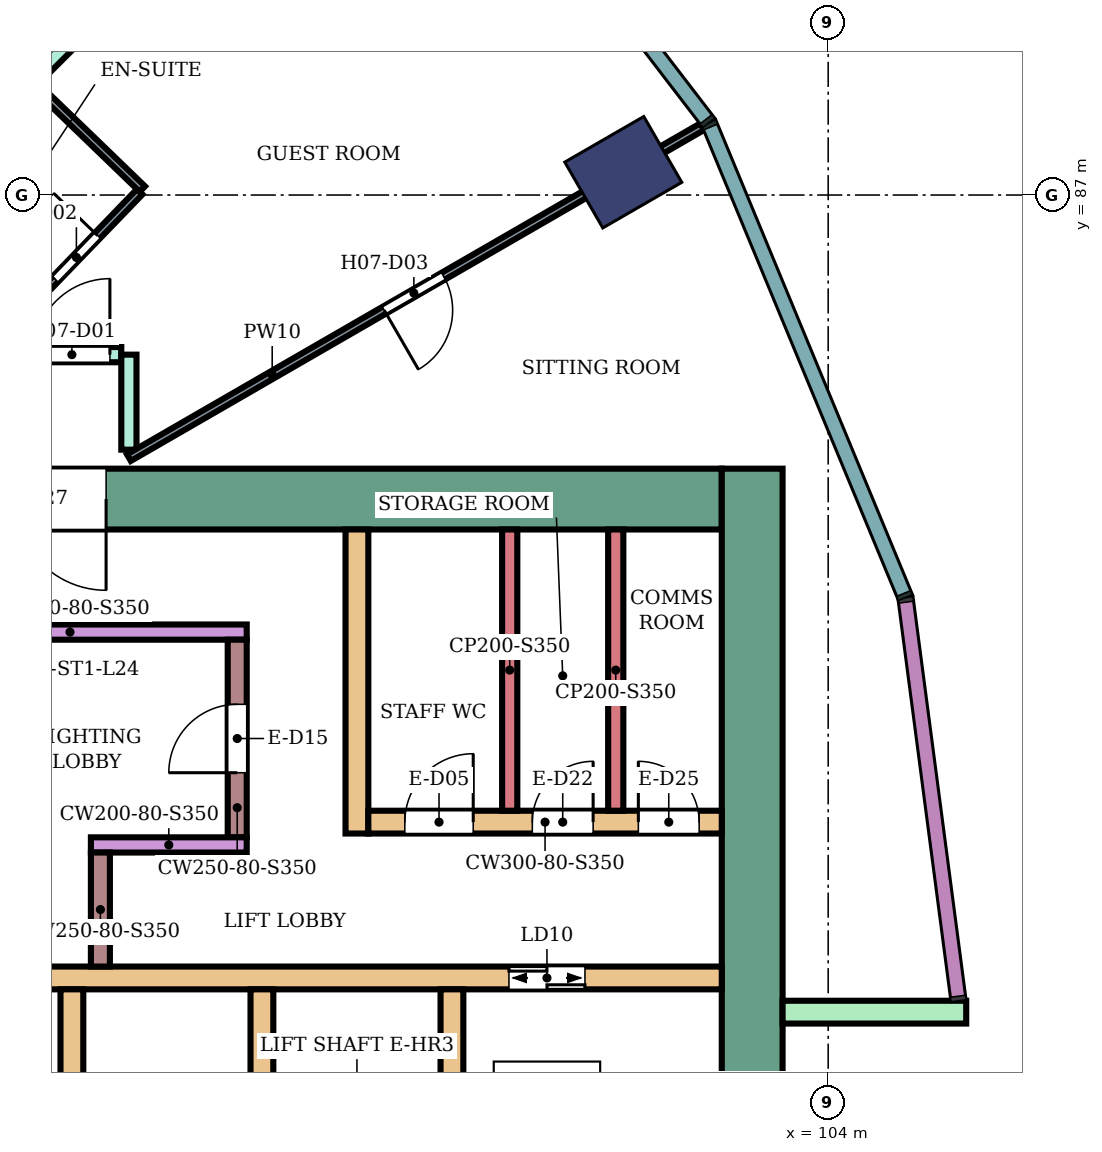
"""IFC4 building model, lengths in metres.
Left out: names, types, materials, properties, quantities, classifications, styles, units other than length and angle.
Written with IfcOpenShell. Run it as: python <this file> out.ifc"""

import sys

from ifc_helpers import new_model, si_unit, direction, frame, frame_2d, origin, origin_2d, place, context, subcontext, project, spatial, rectangle, extrude, element, fill, save


model = new_model("IFC4")
c1 = context("Model", 3, precision=1e-05, world=origin(), true_north=direction((0.0, 1.0)))
c2 = subcontext(c1, "Body", "Model", "MODEL_VIEW")
j1 = project(units=[si_unit("LENGTHUNIT", "METRE"), si_unit("PLANEANGLEUNIT", "RADIAN")], contexts=[c1])
p1 = place(None, origin())
s1 = spatial("IfcSite", under=j1, at=p1, CompositionType="ELEMENT")
p2 = place(p1, origin())
s2 = spatial("IfcBuilding", under=s1, at=p2, CompositionType="ELEMENT")
p3 = place(p2, frame((0.0, 0.0, 105.2)))
s3 = spatial("IfcBuildingStorey", under=s2, at=p3, CompositionType="ELEMENT", Elevation=105.2)
p4 = place(p3, frame((101.304, 87.3, 0.0), z_axis=(0.0, 0.0, 1.0), x_axis=(0.866025403784, 0.5, 0.0)))
e1 = element("IfcColumn", 1, at=p4, inside=s3, PredefinedType="COLUMN", context=c2, shape_type="SweptSolid", body=[
    extrude(rectangle(XDim=1.2, YDim=1.0, at=origin_2d()), origin(), (0.0, 0.0, 1.0), 3.8),
])
p5 = place(p3, frame((87.9, 83.0, 0.0), z_axis=(0.0, 0.0, 1.0), x_axis=(1.0, 0.0, 0.0)))
e2 = element("IfcWall", 2, at=p5, inside=s3, PredefinedType="SHEAR", context=c2, shape_type="SweptSolid", body=[
    extrude(rectangle(XDim=14.7, YDim=0.8, at=frame_2d((7.35, 0.0))), origin(), (0.0, 0.0, 1.0), 3.45),
])
p6 = place(p5, frame((4.2, 0.0, 0.0)))
e3 = element("IfcOpeningElement", 3, at=p6, cuts=e2, PredefinedType="OPENING", context=c2, shape_type="SweptSolid", body=[
    extrude(rectangle(XDim=2.4, YDim=2.4, at=frame_2d((1.2, 1.2))), frame((0.0, 0.41, 0.0), z_axis=(0.0, -1.0, 0.0), x_axis=(1.0, 0.0, 0.0)), (0.0, 0.0, 1.0), 0.82),
])
p7 = place(p3, frame((103.0, 66.6, 0.0), z_axis=(0.0, 0.0, 1.0), x_axis=(0.0, 1.0, 0.0)))
e4 = element("IfcWall", 4, at=p7, inside=s3, PredefinedType="SHEAR", context=c2, shape_type="SweptSolid", body=[
    extrude(rectangle(XDim=16.8, YDim=0.8, at=frame_2d((8.4, 0.0))), origin(), (0.0, 0.0, 1.0), 3.45),
])
p8 = place(p3, frame((91.7, 76.7, 0.0), z_axis=(0.0, 0.0, 1.0), x_axis=(1.0, 0.0, 0.0)))
e5 = element("IfcWall", 5, at=p8, inside=s3, PredefinedType="SHEAR", context=c2, shape_type="SweptSolid", body=[
    extrude(rectangle(XDim=10.9, YDim=0.3, at=frame_2d((5.45, 0.0))), origin(), (0.0, 0.0, 1.0), 3.45),
])
p9 = place(p8, frame((0.55, 0.0, 0.0)))
e6 = element("IfcOpeningElement", 6, at=p9, cuts=e5, PredefinedType="OPENING", context=c2, shape_type="SweptSolid", body=[
    extrude(rectangle(XDim=1.1, YDim=2.1, at=frame_2d((0.55, 1.05))), frame((0.0, 0.16, 0.0), z_axis=(0.0, -1.0, 0.0), x_axis=(1.0, 0.0, 0.0)), (0.0, 0.0, 1.0), 0.32),
])
p10 = place(p8, frame((8.1, 0.0, 0.0)))
e7 = element("IfcOpeningElement", 7, at=p10, cuts=e5, PredefinedType="OPENING", context=c2, shape_type="SweptSolid", body=[
    extrude(rectangle(XDim=1.0, YDim=2.1, at=frame_2d((0.5, 1.05))), frame((0.0, 0.16, 0.0), z_axis=(0.0, -1.0, 0.0), x_axis=(1.0, 0.0, 0.0)), (0.0, 0.0, 1.0), 0.32),
])
for number, where, z_axis, x_axis in (
    (8, (94.05, 74.0, 0.0), (0.0, 0.0, 1.0), (0.0, 1.0, 0.0)),
    (9, (96.55, 74.0, 0.0), (0.0, 0.0, 1.0), (0.0, 1.0, 0.0)),
    (10, (99.05, 74.0, 0.0), (0.0, 0.0, 1.0), (0.0, 1.0, 0.0)),
):
    element("IfcWall", number, at=place(p3, frame(where, z_axis=z_axis, x_axis=x_axis)), inside=s3, PredefinedType="SHEAR", context=c2, shape_type="SweptSolid", body=[
        extrude(rectangle(XDim=2.55, YDim=0.3, at=frame_2d((1.275, 0.0))), origin(), (0.0, 0.0, 1.0), 3.45),
    ])
p11 = place(p3, frame((91.7, 81.25, 0.0), z_axis=(0.0, 0.0, 1.0), x_axis=(1.0, 0.0, 0.0)))
e11 = element("IfcWall", 11, at=p11, inside=s3, PredefinedType="SHEAR", context=c2, shape_type="SweptSolid", body=[
    extrude(rectangle(XDim=4.65, YDim=0.2, at=frame_2d((2.325, 0.0))), origin(), (0.0, 0.0, 1.0), 3.45),
])
p12 = place(p3, frame((96.225, 78.55, 0.0), z_axis=(0.0, 0.0, 1.0), x_axis=(0.0, 1.0, 0.0)))
e12 = element("IfcWall", 12, at=p12, inside=s3, PredefinedType="SHEAR", context=c2, shape_type="SweptSolid", body=[
    extrude(rectangle(XDim=2.6, YDim=0.25, at=frame_2d((1.3, 0.0))), origin(), (0.0, 0.0, 1.0), 3.45),
])
p13 = place(p12, frame((0.85, 0.0, 0.0)))
e13 = element("IfcOpeningElement", 13, at=p13, cuts=e12, PredefinedType="OPENING", context=c2, shape_type="SweptSolid", body=[
    extrude(rectangle(XDim=0.9, YDim=2.1, at=frame_2d((0.45, 1.05))), frame((0.0, 0.135, 0.0), z_axis=(0.0, -1.0, 0.0), x_axis=(1.0, 0.0, 0.0)), (0.0, 0.0, 1.0), 0.27),
])
p14 = place(p3, frame((94.3, 78.45, 0.0), z_axis=(0.0, 0.0, 1.0), x_axis=(1.0, 0.0, 0.0)))
e14 = element("IfcWall", 14, at=p14, inside=s3, PredefinedType="SHEAR", context=c2, shape_type="SweptSolid", body=[
    extrude(rectangle(XDim=2.05, YDim=0.2, at=frame_2d((1.025, 0.0))), origin(), (0.0, 0.0, 1.0), 3.45),
])
p15 = place(p3, frame((94.425, 76.85, 0.0), z_axis=(0.0, 0.0, 1.0), x_axis=(0.0, 1.0, 0.0)))
e15 = element("IfcWall", 15, at=p15, inside=s3, PredefinedType="SHEAR", context=c2, shape_type="SweptSolid", body=[
    extrude(rectangle(XDim=1.5, YDim=0.25, at=frame_2d((0.75, 0.0))), origin(), (0.0, 0.0, 1.0), 3.45),
])
p16 = place(p3, frame((97.8, 78.6, 0.0), z_axis=(0.0, 0.0, 1.0), x_axis=(0.0, 1.0, 0.0)))
e16 = element("IfcWall", 16, at=p16, inside=s3, PredefinedType="SHEAR", context=c2, shape_type="SweptSolid", body=[
    extrude(rectangle(XDim=4.0, YDim=0.3, at=frame_2d((2.0, 0.0))), origin(), (0.0, 0.0, 1.0), 3.45),
])
p17 = place(p3, frame((97.95, 78.75, 0.0), z_axis=(0.0, 0.0, 1.0), x_axis=(1.0, 0.0, 0.0)))
e17 = element("IfcWall", 17, at=p17, inside=s3, PredefinedType="SHEAR", context=c2, shape_type="SweptSolid", body=[
    extrude(rectangle(XDim=4.65, YDim=0.3, at=frame_2d((2.325, 0.0))), origin(), (0.0, 0.0, 1.0), 3.45),
])
p18 = place(p17, frame((0.48, 0.0, 0.0)))
e18 = element("IfcOpeningElement", 18, at=p18, cuts=e17, PredefinedType="OPENING", context=c2, shape_type="SweptSolid", body=[
    extrude(rectangle(XDim=0.9, YDim=2.1, at=frame_2d((0.45, 1.05))), frame((0.0, 0.16, 0.0), z_axis=(0.0, -1.0, 0.0), x_axis=(1.0, 0.0, 0.0)), (0.0, 0.0, 1.0), 0.32),
])
p19 = place(p17, frame((2.157, 0.0, 0.0)))
e19 = element("IfcOpeningElement", 19, at=p19, cuts=e17, PredefinedType="OPENING", context=c2, shape_type="SweptSolid", body=[
    extrude(rectangle(XDim=0.8, YDim=2.1, at=frame_2d((0.4, 1.05))), frame((0.0, 0.16, 0.0), z_axis=(0.0, -1.0, 0.0), x_axis=(1.0, 0.0, 0.0)), (0.0, 0.0, 1.0), 0.32),
])
p20 = place(p17, frame((3.552, 0.0, 0.0)))
e20 = element("IfcOpeningElement", 20, at=p20, cuts=e17, PredefinedType="OPENING", context=c2, shape_type="SweptSolid", body=[
    extrude(rectangle(XDim=0.8, YDim=2.1, at=frame_2d((0.4, 1.05))), frame((0.0, 0.16, 0.0), z_axis=(0.0, -1.0, 0.0), x_axis=(1.0, 0.0, 0.0)), (0.0, 0.0, 1.0), 0.32),
])
p21 = place(p3, frame((103.4, 76.25, 0.0), z_axis=(0.0, 0.0, 1.0), x_axis=(1.0, 0.0, 0.0)))
e21 = element("IfcWall", 21, at=p21, inside=s3, PredefinedType="NOTDEFINED", context=c2, shape_type="SweptSolid", body=[
    extrude(rectangle(XDim=2.416, YDim=0.3, at=frame_2d((1.208, 0.0))), origin(), (0.0, 0.0, 1.0), 3.8),
])
p22 = place(p3, frame((91.595, 86.59, 0.0), z_axis=(0.0, 0.0, 1.0), x_axis=(0.707268206752, 0.706945318761, 0.0)))
e22 = element("IfcWall", 22, at=p22, inside=s3, PredefinedType="PARTITIONING", context=c2, shape_type="SweptSolid", body=[
    extrude(rectangle(XDim=6.805, YDim=0.2, at=frame_2d((3.402, 0.0))), origin(), (0.0, 0.0, 1.0), 3.35),
])
p23 = place(p3, frame((93.203, 84.9, 0.0), z_axis=(0.0, 0.0, 1.0), x_axis=(1.0, 0.0, 0.0)))
e23 = element("IfcWall", 23, at=p23, inside=s3, PredefinedType="PARTITIONING", context=c2, shape_type="SweptSolid", body=[
    extrude(rectangle(XDim=1.497, YDim=0.2, at=frame_2d((0.749, 0.0))), origin(), (0.0, 0.0, 1.0), 3.35),
])
p24 = place(p23, frame((0.347, 0.0, 0.0)))
e24 = element("IfcOpeningElement", 24, at=p24, cuts=e23, PredefinedType="OPENING", context=c2, shape_type="SweptSolid", body=[
    extrude(rectangle(XDim=1.0, YDim=2.1, at=frame_2d((0.5, 1.05))), frame((0.0, 0.11, 0.0), z_axis=(0.0, -1.0, 0.0), x_axis=(1.0, 0.0, 0.0)), (0.0, 0.0, 1.0), 0.22),
])
p25 = place(p3, frame((94.8, 83.65, 0.0), z_axis=(0.0, 0.0, 1.0), x_axis=(0.0, 1.0, 0.0)))
e25 = element("IfcWall", 25, at=p25, inside=s3, PredefinedType="PARTITIONING", context=c2, shape_type="SweptSolid", body=[
    extrude(rectangle(XDim=1.25, YDim=0.2, at=frame_2d((0.625, 0.0))), origin(), (0.0, 0.0, 1.0), 3.35),
])
p26 = place(p3, frame((93.103, 85.136, 0.0), z_axis=(0.0, 0.0, 1.0), x_axis=(0.694324808789, 0.719661767708, 0.0)))
e26 = element("IfcWall", 26, at=p26, inside=s3, PredefinedType="PARTITIONING", context=c2, shape_type="SweptSolid", body=[
    extrude(rectangle(XDim=2.65, YDim=0.1, at=frame_2d((1.325, 0.0))), origin(), (0.0, 0.0, 1.0), 3.35),
])
p27 = place(p26, frame((1.05, 0.0, 0.0)))
e27 = element("IfcOpeningElement", 27, at=p27, cuts=e26, PredefinedType="OPENING", context=c2, shape_type="SweptSolid", body=[
    extrude(rectangle(XDim=0.8, YDim=2.1, at=frame_2d((0.4, 1.05))), frame((0.0, 0.06, 0.0), z_axis=(0.0, -1.0, 0.0), x_axis=(1.0, 0.0, 0.0)), (0.0, 0.0, 1.0), 0.12),
])
p28 = place(p3, frame((93.581, 88.426, 0.0), z_axis=(0.0, 0.0, 1.0), x_axis=(0.719707242969, -0.694277670977, 0.0)))
e28 = element("IfcWall", 28, at=p28, inside=s3, PredefinedType="PARTITIONING", context=c2, shape_type="SweptSolid", body=[
    extrude(rectangle(XDim=1.939, YDim=0.1, at=frame_2d((0.97, 0.0))), origin(), (0.0, 0.0, 1.0), 3.35),
])
p29 = place(p3, frame((94.8, 83.545, 0.0), z_axis=(0.0, 0.0, 1.0), x_axis=(0.86602264145, 0.500004784474, 0.0)))
e29 = element("IfcWall", 29, at=p29, inside=s3, PredefinedType="PARTITIONING", context=c2, shape_type="SweptSolid", body=[
    extrude(rectangle(XDim=8.708, YDim=0.1, at=frame_2d((4.354, 0.0))), origin(), (0.0, 0.0, 1.0), 3.35),
])
p30 = place(p29, frame((3.879, 0.0, 0.0)))
e30 = element("IfcOpeningElement", 30, at=p30, cuts=e29, PredefinedType="OPENING", context=c2, shape_type="SweptSolid", body=[
    extrude(rectangle(XDim=0.9, YDim=2.1, at=frame_2d((0.45, 1.05))), frame((0.0, 0.06, 0.0), z_axis=(0.0, -1.0, 0.0), x_axis=(1.0, 0.0, 0.0)), (0.0, 0.0, 1.0), 0.12),
])
for number, where, z_axis, x_axis in (
    (31, (99.81, 78.9, 0.0), (0.0, 0.0, 1.0), (0.0, 1.0, 0.0)),
    (32, (101.205, 78.9, 0.0), (0.0, 0.0, 1.0), (0.0, 1.0, 0.0)),
):
    element("IfcWall", number, at=place(p3, frame(where, z_axis=z_axis, x_axis=x_axis)), inside=s3, PredefinedType="PARTITIONING", context=c2, shape_type="SweptSolid", body=[
        extrude(rectangle(XDim=3.7, YDim=0.2, at=frame_2d((1.85, 0.0))), origin(), (0.0, 0.0, 1.0), 3.45),
    ])
p31 = place(p24, origin())
e33 = element("IfcDoor", 33, at=p31, inside=s3, OperationType="SINGLE_SWING_RIGHT", PredefinedType="DOOR", context=c2, shape_type="SweptSolid", body=[
    extrude(rectangle(XDim=1.0, YDim=2.1, at=frame_2d((0.5, 1.05))), frame((0.0, 0.025, 0.0), z_axis=(0.0, -1.0, 0.0), x_axis=(1.0, 0.0, 0.0)), (0.0, 0.0, 1.0), 0.05),
])
fill(e24, e33)
p32 = place(p27, origin())
e34 = element("IfcDoor", 34, at=p32, inside=s3, OperationType="SINGLE_SWING_RIGHT", PredefinedType="DOOR", context=c2, shape_type="SweptSolid", body=[
    extrude(rectangle(XDim=0.8, YDim=2.1, at=frame_2d((0.4, 1.05))), frame((0.0, 0.025, 0.0), z_axis=(0.0, -1.0, 0.0), x_axis=(1.0, 0.0, 0.0)), (0.0, 0.0, 1.0), 0.05),
])
fill(e27, e34)
p33 = place(p30, frame((0.9, 0.0, 0.0), z_axis=(0.0, 0.0, 1.0), x_axis=(-1.0, 0.0, 0.0)))
e35 = element("IfcDoor", 35, at=p33, inside=s3, OperationType="SINGLE_SWING_RIGHT", PredefinedType="DOOR", context=c2, shape_type="SweptSolid", body=[
    extrude(rectangle(XDim=0.9, YDim=2.1, at=frame_2d((0.45, 1.05))), frame((0.0, 0.025, 0.0), z_axis=(0.0, -1.0, 0.0), x_axis=(1.0, 0.0, 0.0)), (0.0, 0.0, 1.0), 0.05),
])
fill(e30, e35)
p34 = place(p10, origin())
e36 = element("IfcDoor", 36, at=p34, inside=s3, OperationType="DOUBLE_DOOR_SLIDING", PredefinedType="DOOR", context=c2, shape_type="SweptSolid", body=[
    extrude(rectangle(XDim=1.0, YDim=2.1, at=frame_2d((0.5, 1.05))), frame((0.0, 0.025, 0.0), z_axis=(0.0, -1.0, 0.0), x_axis=(1.0, 0.0, 0.0)), (0.0, 0.0, 1.0), 0.05),
])
fill(e7, e36)
p35 = place(p13, origin())
e37 = element("IfcDoor", 37, at=p35, inside=s3, OperationType="SINGLE_SWING_LEFT", PredefinedType="DOOR", context=c2, shape_type="SweptSolid", body=[
    extrude(rectangle(XDim=0.9, YDim=2.1, at=frame_2d((0.45, 1.05))), frame((0.0, 0.025, 0.0), z_axis=(0.0, -1.0, 0.0), x_axis=(1.0, 0.0, 0.0)), (0.0, 0.0, 1.0), 0.05),
])
fill(e13, e37)
p36 = place(p18, origin())
e38 = element("IfcDoor", 38, at=p36, inside=s3, OperationType="SINGLE_SWING_RIGHT", PredefinedType="DOOR", context=c2, shape_type="SweptSolid", body=[
    extrude(rectangle(XDim=0.9, YDim=2.1, at=frame_2d((0.45, 1.05))), frame((0.0, 0.025, 0.0), z_axis=(0.0, -1.0, 0.0), x_axis=(1.0, 0.0, 0.0)), (0.0, 0.0, 1.0), 0.05),
])
fill(e18, e38)
p37 = place(p19, origin())
e39 = element("IfcDoor", 39, at=p37, inside=s3, OperationType="SINGLE_SWING_RIGHT", PredefinedType="DOOR", context=c2, shape_type="SweptSolid", body=[
    extrude(rectangle(XDim=0.8, YDim=2.1, at=frame_2d((0.4, 1.05))), frame((0.0, 0.025, 0.0), z_axis=(0.0, -1.0, 0.0), x_axis=(1.0, 0.0, 0.0)), (0.0, 0.0, 1.0), 0.05),
])
fill(e19, e39)
p38 = place(p20, origin())
e40 = element("IfcDoor", 40, at=p38, inside=s3, OperationType="SINGLE_SWING_LEFT", PredefinedType="DOOR", context=c2, shape_type="SweptSolid", body=[
    extrude(rectangle(XDim=0.8, YDim=2.1, at=frame_2d((0.4, 1.05))), frame((0.0, 0.025, 0.0), z_axis=(0.0, -1.0, 0.0), x_axis=(1.0, 0.0, 0.0)), (0.0, 0.0, 1.0), 0.05),
])
fill(e20, e40)
p39 = place(p6, frame((2.4, 0.0, 0.0), z_axis=(0.0, 0.0, 1.0), x_axis=(-1.0, 0.0, 0.0)))
e41 = element("IfcDoor", 41, at=p39, inside=s3, OperationType="DOUBLE_DOOR_SINGLE_SWING", PredefinedType="DOOR", context=c2, shape_type="SweptSolid", body=[
    extrude(rectangle(XDim=2.4, YDim=2.4, at=frame_2d((1.2, 1.2))), frame((0.0, 0.025, 0.0), z_axis=(0.0, -1.0, 0.0), x_axis=(1.0, 0.0, 0.0)), (0.0, 0.0, 1.0), 0.05),
])
fill(e3, e41)
save(model, sys.argv[1])
